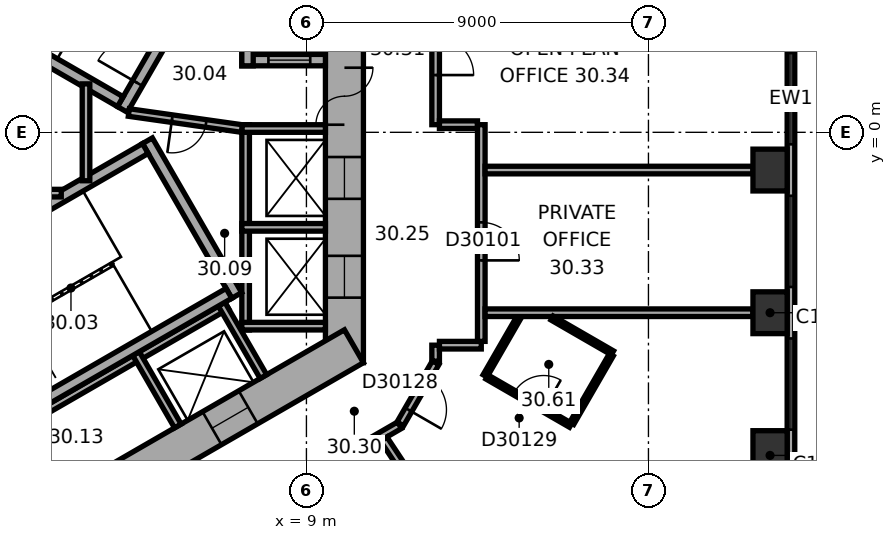
"""IFC4 building model, lengths in metres.
Left out: names, types, materials, properties, quantities, classifications, styles, units other than length and angle.
Written with IfcOpenShell. Run it as: python <this file> out.ifc"""

import sys

from ifc_helpers import new_model, si_unit, direction, frame, frame_2d, origin, origin_2d, place, context, subcontext, project, spatial, rectangle, extrude, element, fill, save


model = new_model("IFC4")
c1 = context("Model", 3, precision=1e-05, world=origin(), true_north=direction((0.0, 1.0)))
c2 = subcontext(c1, "Body", "Model", "MODEL_VIEW")
j1 = project(units=[si_unit("LENGTHUNIT", "METRE"), si_unit("PLANEANGLEUNIT", "RADIAN")], contexts=[c1])
p1 = place(None, origin())
s1 = spatial("IfcSite", under=j1, at=p1, CompositionType="ELEMENT")
p2 = place(p1, origin())
s2 = spatial("IfcBuilding", under=s1, at=p2, CompositionType="ELEMENT")
p3 = place(p2, frame((0.0, 0.0, 124.4)))
s3 = spatial("IfcBuildingStorey", under=s2, at=p3, CompositionType="ELEMENT", Elevation=124.4)
p4 = place(p3, frame((21.2, -8.501, 0.0), z_axis=(0.0, 0.0, 1.0), x_axis=(0.0, 1.0, 0.0)))
e1 = element("IfcColumn", 1, at=p4, inside=s3, PredefinedType="COLUMN", context=c2, shape_type="SweptSolid", body=[
    extrude(rectangle(XDim=1.3, YDim=0.9, at=origin_2d()), origin(), (0.0, 0.0, 1.0), 3.7),
])
for number, where, z_axis, x_axis in (
    (2, (21.2, -4.747, 0.0), (0.0, 0.0, 1.0), (0.0, 1.0, 0.0)),
    (3, (21.2, -0.993, 0.0), (0.0, 0.0, 1.0), (0.0, 1.0, 0.0)),
):
    element("IfcColumn", number, at=place(p3, frame(where, z_axis=z_axis, x_axis=x_axis)), inside=s3, PredefinedType="COLUMN", context=c2, shape_type="SweptSolid", body=[
        extrude(rectangle(XDim=1.1, YDim=0.9, at=origin_2d()), origin(), (0.0, 0.0, 1.0), 3.7),
    ])
p5 = place(p3, frame((10.0, -6.062, 0.0), z_axis=(0.0, 0.0, 1.0), x_axis=(0.0, 1.0, 0.0)))
e4 = element("IfcWall", 4, at=p5, inside=s3, PredefinedType="SHEAR", context=c2, shape_type="SweptSolid", body=[
    extrude(rectangle(XDim=12.125, YDim=1.0, at=frame_2d((6.062, 0.0))), origin(), (0.0, 0.0, 1.0), 3.7),
])
p6 = place(p5, frame((6.262, 0.0, 0.0)))
e5 = element("IfcOpeningElement", 5, at=p6, cuts=e4, PredefinedType="OPENING", context=c2, shape_type="SweptSolid", body=[
    extrude(rectangle(XDim=1.5, YDim=2.1, at=frame_2d((0.75, 1.05))), frame((0.0, 0.51, 0.0), z_axis=(0.0, -1.0, 0.0), x_axis=(1.0, 0.0, 0.0)), (0.0, 0.0, 1.0), 1.02),
])
p7 = place(p5, frame((1.712, 0.0, 0.0)))
e6 = element("IfcOpeningElement", 6, at=p7, cuts=e4, PredefinedType="OPENING", context=c2, shape_type="SweptSolid", body=[
    extrude(rectangle(XDim=1.1, YDim=2.1, at=frame_2d((0.55, 1.05))), frame((0.0, 0.51, 0.0), z_axis=(0.0, -1.0, 0.0), x_axis=(1.0, 0.0, 0.0)), (0.0, 0.0, 1.0), 1.02),
])
p8 = place(p5, frame((4.312, 0.0, 0.0)))
e7 = element("IfcOpeningElement", 7, at=p8, cuts=e4, PredefinedType="OPENING", context=c2, shape_type="SweptSolid", body=[
    extrude(rectangle(XDim=1.1, YDim=2.1, at=frame_2d((0.55, 1.05))), frame((0.0, 0.51, 0.0), z_axis=(0.0, -1.0, 0.0), x_axis=(1.0, 0.0, 0.0)), (0.0, 0.0, 1.0), 1.02),
])
p9 = place(p3, frame((-0.25, -11.691, 0.0), z_axis=(0.0, 0.0, 1.0), x_axis=(0.866022616891, 0.50000482701, 0.0)))
e8 = element("IfcWall", 8, at=p9, inside=s3, PredefinedType="SHEAR", context=c2, shape_type="SweptSolid", body=[
    extrude(rectangle(XDim=12.125, YDim=1.0, at=frame_2d((6.062, 0.0))), origin(), (0.0, 0.0, 1.0), 3.7),
])
p10 = place(p9, frame((4.012, 0.0, 0.0)))
e9 = element("IfcOpeningElement", 9, at=p10, cuts=e8, PredefinedType="OPENING", context=c2, shape_type="SweptSolid", body=[
    extrude(rectangle(XDim=0.9, YDim=2.1, at=frame_2d((0.45, 1.05))), frame((0.0, 0.51, 0.0), z_axis=(0.0, -1.0, 0.0), x_axis=(1.0, 0.0, 0.0)), (0.0, 0.0, 1.0), 1.02),
])
p11 = place(p9, frame((7.812, 0.0, 0.0)))
e10 = element("IfcOpeningElement", 10, at=p11, cuts=e8, PredefinedType="OPENING", context=c2, shape_type="SweptSolid", body=[
    extrude(rectangle(XDim=1.1, YDim=2.1, at=frame_2d((0.55, 1.05))), frame((0.0, 0.51, 0.0), z_axis=(0.0, -1.0, 0.0), x_axis=(1.0, 0.0, 0.0)), (0.0, 0.0, 1.0), 1.02),
])
p12 = place(p3, frame((21.75, -9.138, 0.0), z_axis=(0.0, 0.0, 1.0), x_axis=(0.0, 1.0, 0.0)))
e11 = element("IfcWall", 11, at=p12, inside=s3, PredefinedType="STANDARD", context=c2, shape_type="SweptSolid", body=[
    extrude(rectangle(XDim=20.044, YDim=0.2, at=frame_2d((10.022, 0.0))), origin(), (0.0, 0.0, 1.0), 3.7),
])
p13 = place(p12, frame((1.314, 0.0, 0.9)))
e12 = element("IfcOpeningElement", 12, at=p13, cuts=e11, PredefinedType="OPENING", context=c2, shape_type="SweptSolid", body=[
    extrude(rectangle(XDim=2.4, YDim=2.0, at=frame_2d((1.2, 1.0))), frame((0.0, 0.11, 0.0), z_axis=(0.0, -1.0, 0.0), x_axis=(1.0, 0.0, 0.0)), (0.0, 0.0, 1.0), 0.22),
])
p14 = place(p12, frame((5.069, 0.0, 0.9)))
e13 = element("IfcOpeningElement", 13, at=p14, cuts=e11, PredefinedType="OPENING", context=c2, shape_type="SweptSolid", body=[
    extrude(rectangle(XDim=2.4, YDim=2.0, at=frame_2d((1.2, 1.0))), frame((0.0, 0.11, 0.0), z_axis=(0.0, -1.0, 0.0), x_axis=(1.0, 0.0, 0.0)), (0.0, 0.0, 1.0), 0.22),
])
p15 = place(p12, frame((8.823, 0.0, 0.9)))
e14 = element("IfcOpeningElement", 14, at=p15, cuts=e11, PredefinedType="OPENING", context=c2, shape_type="SweptSolid", body=[
    extrude(rectangle(XDim=2.4, YDim=2.0, at=frame_2d((1.2, 1.0))), frame((0.0, 0.11, 0.0), z_axis=(0.0, -1.0, 0.0), x_axis=(1.0, 0.0, 0.0)), (0.0, 0.0, 1.0), 0.22),
])
p16 = place(p12, frame((12.577, 0.0, 0.9)))
e15 = element("IfcOpeningElement", 15, at=p16, cuts=e11, PredefinedType="OPENING", context=c2, shape_type="SweptSolid", body=[
    extrude(rectangle(XDim=2.4, YDim=2.0, at=frame_2d((1.2, 1.0))), frame((0.0, 0.11, 0.0), z_axis=(0.0, -1.0, 0.0), x_axis=(1.0, 0.0, 0.0)), (0.0, 0.0, 1.0), 0.22),
])
p17 = place(p12, frame((16.331, 0.0, 0.9)))
e16 = element("IfcOpeningElement", 16, at=p17, cuts=e11, PredefinedType="OPENING", context=c2, shape_type="SweptSolid", body=[
    extrude(rectangle(XDim=2.4, YDim=2.0, at=frame_2d((1.2, 1.0))), frame((0.0, 0.11, 0.0), z_axis=(0.0, -1.0, 0.0), x_axis=(1.0, 0.0, 0.0)), (0.0, 0.0, 1.0), 0.22),
])
p18 = place(p3, frame((7.4, -5.2, 0.0), z_axis=(0.0, 0.0, 1.0), x_axis=(0.0, 1.0, 0.0)))
e17 = element("IfcWall", 17, at=p18, inside=s3, PredefinedType="PARTITIONING", context=c2, shape_type="SweptSolid", body=[
    extrude(rectangle(XDim=5.4, YDim=0.2, at=frame_2d((2.7, 0.0))), origin(), (0.0, 0.0, 1.0), 3.42),
])
for number, where, z_axis, x_axis in (
    (18, (7.3, -5.1, 0.0), (0.0, 0.0, 1.0), (1.0, 0.0, 0.0)),
    (19, (7.3, -2.5, 0.0), (0.0, 0.0, 1.0), (1.0, 0.0, 0.0)),
    (20, (7.3, 0.1, 0.0), (0.0, 0.0, 1.0), (1.0, 0.0, 0.0)),
):
    element("IfcWall", number, at=place(p3, frame(where, z_axis=z_axis, x_axis=x_axis)), inside=s3, PredefinedType="PARTITIONING", context=c2, shape_type="SweptSolid", body=[
        extrude(rectangle(XDim=2.2, YDim=0.2, at=frame_2d((1.1, 0.0))), origin(), (0.0, 0.0, 1.0), 3.42),
    ])
p19 = place(p3, frame((-0.024, -8.559, 0.0), z_axis=(0.0, 0.0, 1.0), x_axis=(0.866026010844, 0.49999894854, 0.0)))
e21 = element("IfcWall", 21, at=p19, inside=s3, PredefinedType="PARTITIONING", context=c2, shape_type="SweptSolid", body=[
    extrude(rectangle(XDim=8.0, YDim=0.2, at=frame_2d((4.0, 0.0))), origin(), (0.0, 0.0, 1.0), 3.42),
])
for number, where, z_axis, x_axis in (
    (22, (4.516, -5.822, 0.0), (0.0, 0.0, 1.0), (0.5, -0.866, 0.0)),
    (23, (6.768, -4.522, 0.0), (0.0, 0.0, 1.0), (0.5, -0.866, 0.0)),
):
    element("IfcWall", number, at=place(p3, frame(where, z_axis=z_axis, x_axis=x_axis)), inside=s3, PredefinedType="PARTITIONING", context=c2, shape_type="SweptSolid", body=[
        extrude(rectangle(XDim=2.2, YDim=0.2, at=frame_2d((1.1, 0.0))), origin(), (0.0, 0.0, 1.0), 3.42),
    ])
p20 = place(p3, frame((4.158, 0.602, 0.0), z_axis=(0.0, 0.0, 1.0), x_axis=(0.499977259774, 0.866038532462, 0.0)))
e24 = element("IfcWall", 24, at=p20, inside=s3, PredefinedType="SHEAR", context=c2, shape_type="SweptSolid", body=[
    extrude(rectangle(XDim=4.7, YDim=0.3, at=frame_2d((2.35, 0.0))), origin(), (0.0, 0.0, 1.0), 3.42),
])
p21 = place(p20, frame((0.8, 0.0, 0.0)))
e25 = element("IfcOpeningElement", 25, at=p21, cuts=e24, PredefinedType="OPENING", context=c2, shape_type="SweptSolid", body=[
    extrude(rectangle(XDim=1.2, YDim=2.1, at=frame_2d((0.6, 1.05))), frame((0.0, 0.16, 0.0), z_axis=(0.0, -1.0, 0.0), x_axis=(1.0, 0.0, 0.0)), (0.0, 0.0, 1.0), 0.32),
])
p22 = place(p3, frame((4.103, 0.807, 0.0), z_axis=(0.0, 0.0, 1.0), x_axis=(-0.866027801685, 0.499995846692, 0.0)))
e26 = element("IfcWall", 26, at=p22, inside=s3, PredefinedType="SHEAR", context=c2, shape_type="SweptSolid", body=[
    extrude(rectangle(XDim=7.06, YDim=0.3, at=frame_2d((3.53, 0.0))), origin(), (0.0, 0.0, 1.0), 3.42),
])
p23 = place(p3, frame((4.816, -0.222, 0.0), z_axis=(0.0, 0.0, 1.0), x_axis=(0.499977259774, -0.866038532462, 0.0)))
e27 = element("IfcWall", 27, at=p23, inside=s3, PredefinedType="SHEAR", context=c2, shape_type="SweptSolid", body=[
    extrude(rectangle(XDim=4.7, YDim=0.3, at=frame_2d((2.35, 0.0))), origin(), (0.0, 0.0, 1.0), 3.42),
])
for number, where, z_axis, x_axis in (
    (28, (-1.353, -3.957, 0.0), (0.0, 0.0, 1.0), (0.866, 0.5, 0.0)),
    (29, (0.847, -7.767, 0.0), (0.0, 0.0, 1.0), (0.866, 0.5, 0.0)),
):
    element("IfcWall", number, at=place(p3, frame(where, z_axis=z_axis, x_axis=x_axis)), inside=s3, PredefinedType="SHEAR", context=c2, shape_type="SweptSolid", body=[
        extrude(rectangle(XDim=7.06, YDim=0.3, at=frame_2d((3.53, 0.0))), origin(), (0.0, 0.0, 1.0), 3.42),
    ])
p24 = place(p3, frame((7.3, 1.9, 0.0), z_axis=(0.0, 0.0, 1.0), x_axis=(1.0, 0.0, 0.0)))
e30 = element("IfcWall", 30, at=p24, inside=s3, PredefinedType="SHEAR", context=c2, shape_type="SweptSolid", body=[
    extrude(rectangle(XDim=2.2, YDim=0.3, at=frame_2d((1.1, 0.0))), origin(), (0.0, 0.0, 1.0), 3.42),
])
p25 = place(p24, frame((0.7, 0.0, 0.0)))
e31 = element("IfcOpeningElement", 31, at=p25, cuts=e30, PredefinedType="OPENING", context=c2, shape_type="SweptSolid", body=[
    extrude(rectangle(XDim=1.1, YDim=2.1, at=frame_2d((0.55, 1.05))), frame((0.0, 0.16, 0.0), z_axis=(0.0, -1.0, 0.0), x_axis=(1.0, 0.0, 0.0)), (0.0, 0.0, 1.0), 0.32),
])
p26 = place(p3, frame((7.45, 1.75, 0.0), z_axis=(0.0, 0.0, 1.0), x_axis=(0.0, 1.0, 0.0)))
e32 = element("IfcWall", 32, at=p26, inside=s3, PredefinedType="SHEAR", context=c2, shape_type="SweptSolid", body=[
    extrude(rectangle(XDim=3.35, YDim=0.3, at=frame_2d((1.675, 0.0))), origin(), (0.0, 0.0, 1.0), 3.42),
])
p27 = place(p3, frame((4.327, 0.521, 0.0), z_axis=(0.0, 0.0, 1.0), x_axis=(0.990124376366, -0.14019172346, 0.0)))
e33 = element("IfcWall", 33, at=p27, inside=s3, PredefinedType="PARTITIONING", context=c2, shape_type="SweptSolid", body=[
    extrude(rectangle(XDim=3.002, YDim=0.2, at=frame_2d((1.501, 0.0))), origin(), (0.0, 0.0, 1.0), 3.42),
])
p28 = place(p27, frame((1.15, 0.0, 0.0)))
e34 = element("IfcOpeningElement", 34, at=p28, cuts=e33, PredefinedType="OPENING", context=c2, shape_type="SweptSolid", body=[
    extrude(rectangle(XDim=0.9, YDim=2.1, at=frame_2d((0.45, 1.05))), frame((0.0, 0.11, 0.0), z_axis=(0.0, -1.0, 0.0), x_axis=(1.0, 0.0, 0.0)), (0.0, 0.0, 1.0), 0.22),
])
p29 = place(p3, frame((-2.72, -1.6, 0.0), z_axis=(0.0, 0.0, 1.0), x_axis=(1.0, 0.0, 0.0)))
e35 = element("IfcWall", 35, at=p29, inside=s3, PredefinedType="PARTITIONING", context=c2, shape_type="SweptSolid", body=[
    extrude(rectangle(XDim=5.269, YDim=0.2, at=frame_2d((2.634, 0.0))), origin(), (0.0, 0.0, 1.0), 3.42),
])
p30 = place(p3, frame((3.2, -1.275, 0.0), z_axis=(0.0, 0.0, 1.0), x_axis=(0.0, 1.0, 0.0)))
e36 = element("IfcWall", 36, at=p30, inside=s3, PredefinedType="PARTITIONING", context=c2, shape_type="SweptSolid", body=[
    extrude(rectangle(XDim=2.549, YDim=0.2, at=frame_2d((1.275, 0.0))), origin(), (0.0, 0.0, 1.0), 3.42),
])
p31 = place(p3, frame((9.752, -8.688, 0.0), z_axis=(0.0, 0.0, 1.0), x_axis=(0.865974105138, 0.500088841337, 0.0)))
e37 = element("IfcWall", 37, at=p31, inside=s3, PredefinedType="PARTITIONING", context=c2, shape_type="SweptSolid", body=[
    extrude(rectangle(XDim=1.961, YDim=0.2, at=frame_2d((0.98, 0.0))), origin(), (0.0, 0.0, 1.0), 3.42),
])
p32 = place(p3, frame((11.47, -7.673, 0.0), z_axis=(0.0, 0.0, 1.0), x_axis=(0.499964847546, 0.866045698112, 0.0)))
e38 = element("IfcWall", 38, at=p32, inside=s3, PredefinedType="PARTITIONING", context=c2, shape_type="SweptSolid", body=[
    extrude(rectangle(XDim=1.86, YDim=0.2, at=frame_2d((0.93, 0.0))), origin(), (0.0, 0.0, 1.0), 3.42),
])
p33 = place(p32, frame((0.43, 0.0, 0.0)))
e39 = element("IfcOpeningElement", 39, at=p33, cuts=e38, PredefinedType="OPENING", context=c2, shape_type="SweptSolid", body=[
    extrude(rectangle(XDim=1.0, YDim=2.1, at=frame_2d((0.5, 1.05))), frame((0.0, 0.11, 0.0), z_axis=(0.0, -1.0, 0.0), x_axis=(1.0, 0.0, 0.0)), (0.0, 0.0, 1.0), 0.22),
])
p34 = place(p3, frame((12.4, -6.022, 0.0), z_axis=(0.0, 0.0, 1.0), x_axis=(0.0, 1.0, 0.0)))
e40 = element("IfcWall", 40, at=p34, inside=s3, PredefinedType="PARTITIONING", context=c2, shape_type="SweptSolid", body=[
    extrude(rectangle(XDim=0.421, YDim=0.2, at=frame_2d((0.21, 0.0))), origin(), (0.0, 0.0, 1.0), 3.42),
])
p35 = place(p3, frame((12.4, 0.201, 0.0), z_axis=(0.0, 0.0, 1.0), x_axis=(0.0, 1.0, 0.0)))
e41 = element("IfcWall", 41, at=p35, inside=s3, PredefinedType="PARTITIONING", context=c2, shape_type="SweptSolid", body=[
    extrude(rectangle(XDim=5.861, YDim=0.2, at=frame_2d((2.931, 0.0))), origin(), (0.0, 0.0, 1.0), 3.42),
])
p36 = place(p35, frame((1.306, 0.0, 0.0)))
e42 = element("IfcOpeningElement", 42, at=p36, cuts=e41, PredefinedType="OPENING", context=c2, shape_type="SweptSolid", body=[
    extrude(rectangle(XDim=1.0, YDim=2.1, at=frame_2d((0.5, 1.05))), frame((0.0, 0.11, 0.0), z_axis=(0.0, -1.0, 0.0), x_axis=(1.0, 0.0, 0.0)), (0.0, 0.0, 1.0), 0.22),
])
p37 = place(p3, frame((12.5, -5.601, 0.0), z_axis=(0.0, 0.0, 1.0), x_axis=(1.0, 0.0, 0.0)))
e43 = element("IfcWall", 43, at=p37, inside=s3, PredefinedType="PARTITIONING", context=c2, shape_type="SweptSolid", body=[
    extrude(rectangle(XDim=1.101, YDim=0.2, at=frame_2d((0.551, 0.0))), origin(), (0.0, 0.0, 1.0), 3.42),
])
p38 = place(p3, frame((13.501, 0.201, 0.0), z_axis=(0.0, 0.0, 1.0), x_axis=(-1.0, 0.0, 0.0)))
e44 = element("IfcWall", 44, at=p38, inside=s3, PredefinedType="PARTITIONING", context=c2, shape_type="SweptSolid", body=[
    extrude(rectangle(XDim=1.001, YDim=0.2, at=frame_2d((0.5, 0.0))), origin(), (0.0, 0.0, 1.0), 3.42),
])
p39 = place(p3, frame((13.601, -5.501, 0.0), z_axis=(0.0, 0.0, 1.0), x_axis=(0.0, 1.0, 0.0)))
e45 = element("IfcWall", 45, at=p39, inside=s3, PredefinedType="PARTITIONING", context=c2, shape_type="SweptSolid", body=[
    extrude(rectangle(XDim=5.702, YDim=0.2, at=frame_2d((2.851, 0.0))), origin(), (0.0, 0.0, 1.0), 3.42),
])
p40 = place(p39, frame((2.131, 0.0, 0.0)))
e46 = element("IfcOpeningElement", 46, at=p40, cuts=e45, PredefinedType="OPENING", context=c2, shape_type="SweptSolid", body=[
    extrude(rectangle(XDim=1.0, YDim=2.1, at=frame_2d((0.5, 1.05))), frame((0.0, 0.11, 0.0), z_axis=(0.0, -1.0, 0.0), x_axis=(1.0, 0.0, 0.0)), (0.0, 0.0, 1.0), 0.22),
])
p41 = place(p3, frame((13.701, -6.409, 0.0), z_axis=(0.0, 0.0, 1.0), x_axis=(0.500078724409, 0.865979947454, 0.0)))
e47 = element("IfcWall", 47, at=p41, inside=s3, PredefinedType="PARTITIONING", context=c2, shape_type="SweptSolid", body=[
    extrude(rectangle(XDim=1.78, YDim=0.12, at=frame_2d((0.89, 0.0))), origin(), (0.0, 0.0, 1.0), 3.42),
])
p42 = place(p3, frame((13.701, -4.747, 0.0), z_axis=(0.0, 0.0, 1.0), x_axis=(1.0, 0.0, 0.0)))
e48 = element("IfcWall", 48, at=p42, inside=s3, PredefinedType="PARTITIONING", context=c2, shape_type="SweptSolid", body=[
    extrude(rectangle(XDim=7.049, YDim=0.2, at=frame_2d((3.524, 0.0))), origin(), (0.0, 0.0, 1.0), 3.42),
])
p43 = place(p3, frame((15.411, -14.683, 0.0), z_axis=(0.0, 0.0, 1.0), x_axis=(-0.551932106251, 0.833889051427, 0.0)))
e49 = element("IfcWall", 49, at=p43, inside=s3, PredefinedType="PARTITIONING", context=c2, shape_type="SweptSolid", body=[
    extrude(rectangle(XDim=7.926, YDim=0.2, at=frame_2d((3.963, 0.0))), origin(), (0.0, 0.0, 1.0), 2.87),
])
p44 = place(p3, frame((15.464, -4.887, 0.0), z_axis=(0.0, 0.0, 1.0), x_axis=(0.866063652425, -0.499933745558, 0.0)))
e50 = element("IfcWall", 50, at=p44, inside=s3, PredefinedType="PARTITIONING", context=c2, shape_type="SweptSolid", body=[
    extrude(rectangle(XDim=1.834, YDim=0.12, at=frame_2d((0.917, 0.0))), origin(), (0.0, 0.0, 1.0), 3.42),
])
p45 = place(p3, frame((15.952, -7.709, 0.0), z_axis=(0.0, 0.0, 1.0), x_axis=(-0.866063940332, 0.4999332468, 0.0)))
e51 = element("IfcWall", 51, at=p45, inside=s3, PredefinedType="PARTITIONING", context=c2, shape_type="SweptSolid", body=[
    extrude(rectangle(XDim=2.54, YDim=0.12, at=frame_2d((1.27, 0.0))), origin(), (0.0, 0.0, 1.0), 3.42),
])
p46 = place(p45, frame((0.82, 0.0, 0.0)))
e52 = element("IfcOpeningElement", 52, at=p46, cuts=e51, PredefinedType="OPENING", context=c2, shape_type="SweptSolid", body=[
    extrude(rectangle(XDim=0.9, YDim=2.1, at=frame_2d((0.45, 1.05))), frame((0.0, 0.07, 0.0), z_axis=(0.0, -1.0, 0.0), x_axis=(1.0, 0.0, 0.0)), (0.0, 0.0, 1.0), 0.14),
])
p47 = place(p3, frame((17.022, -5.856, 0.0), z_axis=(0.0, 0.0, 1.0), x_axis=(-0.500027264788, -0.866009661879, 0.0)))
e53 = element("IfcWall", 53, at=p47, inside=s3, PredefinedType="PARTITIONING", context=c2, shape_type="SweptSolid", body=[
    extrude(rectangle(XDim=2.08, YDim=0.12, at=frame_2d((1.04, 0.0))), origin(), (0.0, 0.0, 1.0), 3.42),
])
p48 = place(p3, frame((20.75, -0.993, 0.0), z_axis=(0.0, 0.0, 1.0), x_axis=(-1.0, 0.0, 0.0)))
e54 = element("IfcWall", 54, at=p48, inside=s3, PredefinedType="PARTITIONING", context=c2, shape_type="SweptSolid", body=[
    extrude(rectangle(XDim=7.049, YDim=0.2, at=frame_2d((3.524, 0.0))), origin(), (0.0, 0.0, 1.0), 2.87),
])
p49 = place(p13, origin())
e55 = element("IfcWindow", 55, at=p49, inside=s3, PartitioningType="SINGLE_PANEL", PredefinedType="WINDOW", context=c2, shape_type="SweptSolid", body=[
    extrude(rectangle(XDim=2.4, YDim=2.0, at=frame_2d((1.2, 1.0))), frame((0.0, 0.03, 0.0), z_axis=(0.0, -1.0, 0.0), x_axis=(1.0, 0.0, 0.0)), (0.0, 0.0, 1.0), 0.06),
])
fill(e12, e55)
p50 = place(p14, origin())
e56 = element("IfcWindow", 56, at=p50, inside=s3, PartitioningType="SINGLE_PANEL", PredefinedType="WINDOW", context=c2, shape_type="SweptSolid", body=[
    extrude(rectangle(XDim=2.4, YDim=2.0, at=frame_2d((1.2, 1.0))), frame((0.0, 0.03, 0.0), z_axis=(0.0, -1.0, 0.0), x_axis=(1.0, 0.0, 0.0)), (0.0, 0.0, 1.0), 0.06),
])
fill(e13, e56)
p51 = place(p15, origin())
e57 = element("IfcWindow", 57, at=p51, inside=s3, PartitioningType="SINGLE_PANEL", PredefinedType="WINDOW", context=c2, shape_type="SweptSolid", body=[
    extrude(rectangle(XDim=2.4, YDim=2.0, at=frame_2d((1.2, 1.0))), frame((0.0, 0.03, 0.0), z_axis=(0.0, -1.0, 0.0), x_axis=(1.0, 0.0, 0.0)), (0.0, 0.0, 1.0), 0.06),
])
fill(e14, e57)
p52 = place(p6, origin())
e58 = element("IfcDoor", 58, at=p52, inside=s3, OperationType="DOUBLE_DOOR_SINGLE_SWING", PredefinedType="DOOR", context=c2, shape_type="SweptSolid", body=[
    extrude(rectangle(XDim=1.5, YDim=2.1, at=frame_2d((0.75, 1.05))), frame((0.0, 0.025, 0.0), z_axis=(0.0, -1.0, 0.0), x_axis=(1.0, 0.0, 0.0)), (0.0, 0.0, 1.0), 0.05),
])
fill(e5, e58)
p53 = place(p21, origin())
e59 = element("IfcDoor", 59, at=p53, inside=s3, OperationType="SINGLE_SWING_RIGHT", PredefinedType="DOOR", context=c2, shape_type="SweptSolid", body=[
    extrude(rectangle(XDim=1.2, YDim=2.1, at=frame_2d((0.6, 1.05))), frame((0.0, 0.025, 0.0), z_axis=(0.0, -1.0, 0.0), x_axis=(1.0, 0.0, 0.0)), (0.0, 0.0, 1.0), 0.05),
])
fill(e25, e59)
p54 = place(p28, origin())
e60 = element("IfcDoor", 60, at=p54, inside=s3, OperationType="SINGLE_SWING_LEFT", PredefinedType="DOOR", context=c2, shape_type="SweptSolid", body=[
    extrude(rectangle(XDim=0.9, YDim=2.1, at=frame_2d((0.45, 1.05))), frame((0.0, 0.025, 0.0), z_axis=(0.0, -1.0, 0.0), x_axis=(1.0, 0.0, 0.0)), (0.0, 0.0, 1.0), 0.05),
])
fill(e34, e60)
p55 = place(p25, origin())
e61 = element("IfcDoor", 61, at=p55, inside=s3, OperationType="DOUBLE_DOOR_SLIDING", PredefinedType="DOOR", context=c2, shape_type="SweptSolid", body=[
    extrude(rectangle(XDim=1.1, YDim=2.1, at=frame_2d((0.55, 1.05))), frame((0.0, 0.025, 0.0), z_axis=(0.0, -1.0, 0.0), x_axis=(1.0, 0.0, 0.0)), (0.0, 0.0, 1.0), 0.05),
])
fill(e31, e61)
p56 = place(p7, origin())
e62 = element("IfcDoor", 62, at=p56, inside=s3, OperationType="DOUBLE_DOOR_SLIDING", PredefinedType="DOOR", context=c2, shape_type="SweptSolid", body=[
    extrude(rectangle(XDim=1.1, YDim=2.1, at=frame_2d((0.55, 1.05))), frame((0.0, 0.025, 0.0), z_axis=(0.0, -1.0, 0.0), x_axis=(1.0, 0.0, 0.0)), (0.0, 0.0, 1.0), 0.05),
])
fill(e6, e62)
p57 = place(p8, origin())
e63 = element("IfcDoor", 63, at=p57, inside=s3, OperationType="DOUBLE_DOOR_SLIDING", PredefinedType="DOOR", context=c2, shape_type="SweptSolid", body=[
    extrude(rectangle(XDim=1.1, YDim=2.1, at=frame_2d((0.55, 1.05))), frame((0.0, 0.025, 0.0), z_axis=(0.0, -1.0, 0.0), x_axis=(1.0, 0.0, 0.0)), (0.0, 0.0, 1.0), 0.05),
])
fill(e7, e63)
p58 = place(p11, origin())
e64 = element("IfcDoor", 64, at=p58, inside=s3, OperationType="DOUBLE_DOOR_SLIDING", PredefinedType="DOOR", context=c2, shape_type="SweptSolid", body=[
    extrude(rectangle(XDim=1.1, YDim=2.1, at=frame_2d((0.55, 1.05))), frame((0.0, 0.025, 0.0), z_axis=(0.0, -1.0, 0.0), x_axis=(1.0, 0.0, 0.0)), (0.0, 0.0, 1.0), 0.05),
])
fill(e10, e64)
p59 = place(p40, origin())
e65 = element("IfcDoor", 65, at=p59, inside=s3, OperationType="SINGLE_SWING_LEFT", PredefinedType="DOOR", context=c2, shape_type="SweptSolid", body=[
    extrude(rectangle(XDim=1.0, YDim=2.1, at=frame_2d((0.5, 1.05))), frame((0.0, 0.025, 0.0), z_axis=(0.0, -1.0, 0.0), x_axis=(1.0, 0.0, 0.0)), (0.0, 0.0, 1.0), 0.05),
])
fill(e46, e65)
p60 = place(p36, origin())
e66 = element("IfcDoor", 66, at=p60, inside=s3, OperationType="SINGLE_SWING_LEFT", PredefinedType="DOOR", context=c2, shape_type="SweptSolid", body=[
    extrude(rectangle(XDim=1.0, YDim=2.1, at=frame_2d((0.5, 1.05))), frame((0.0, 0.025, 0.0), z_axis=(0.0, -1.0, 0.0), x_axis=(1.0, 0.0, 0.0)), (0.0, 0.0, 1.0), 0.05),
])
fill(e42, e66)
p61 = place(p33, origin())
e67 = element("IfcDoor", 67, at=p61, inside=s3, OperationType="SINGLE_SWING_LEFT", PredefinedType="DOOR", context=c2, shape_type="SweptSolid", body=[
    extrude(rectangle(XDim=1.0, YDim=2.1, at=frame_2d((0.5, 1.05))), frame((0.0, 0.025, 0.0), z_axis=(0.0, -1.0, 0.0), x_axis=(1.0, 0.0, 0.0)), (0.0, 0.0, 1.0), 0.05),
])
fill(e39, e67)
p62 = place(p46, origin())
e68 = element("IfcDoor", 68, at=p62, inside=s3, OperationType="SINGLE_SWING_LEFT", PredefinedType="DOOR", context=c2, shape_type="SweptSolid", body=[
    extrude(rectangle(XDim=0.9, YDim=2.1, at=frame_2d((0.45, 1.05))), frame((0.0, 0.025, 0.0), z_axis=(0.0, -1.0, 0.0), x_axis=(1.0, 0.0, 0.0)), (0.0, 0.0, 1.0), 0.05),
])
fill(e52, e68)
save(model, sys.argv[1])
